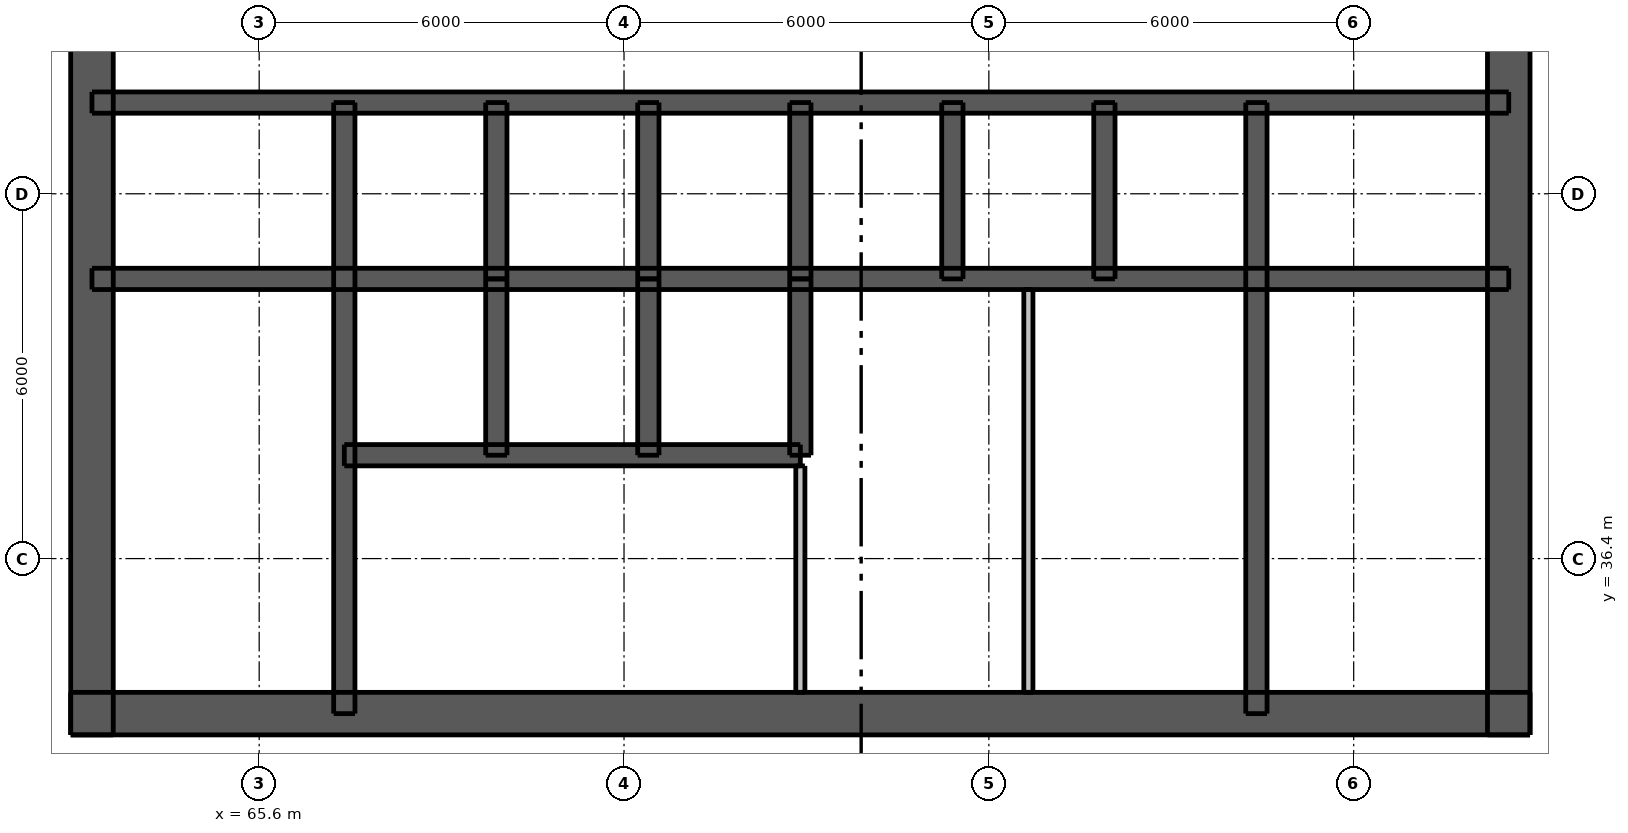
"""IFC4 building model, lengths in metres.
Left out: names, types, materials, properties, quantities, classifications, styles, units other than length and angle.
Written with IfcOpenShell. Run it as: python <this file> out.ifc"""

import sys

from ifc_helpers import new_model, si_unit, direction, frame, frame_2d, origin, place, context, subcontext, project, spatial, rectangle, extrude, element, fill, save


model = new_model("IFC4")
c1 = context("Model", 3, precision=1e-05, world=origin(), true_north=direction((0.0, 1.0)))
c2 = subcontext(c1, "Body", "Model", "MODEL_VIEW")
j1 = project(units=[si_unit("LENGTHUNIT", "METRE"), si_unit("PLANEANGLEUNIT", "RADIAN")], contexts=[c1])
p1 = place(None, origin())
s1 = spatial("IfcSite", under=j1, at=p1, CompositionType="ELEMENT")
p2 = place(p1, origin())
s2 = spatial("IfcBuilding", under=s1, at=p2, CompositionType="ELEMENT")
p3 = place(p2, frame((0.0, 0.0, 154.9)))
s3 = spatial("IfcBuildingStorey", under=s2, at=p3, CompositionType="ELEMENT", Elevation=154.9)
p4 = place(p3, frame((62.5, 33.85, 0.0), z_axis=(0.0, 0.0, 1.0), x_axis=(1.0, 0.0, 0.0)))
e1 = element("IfcWall", 1, at=p4, inside=s3, PredefinedType="SHEAR", context=c2, shape_type="SweptSolid", body=[
    extrude(rectangle(XDim=24.0, YDim=0.7, at=frame_2d((12.0, 0.0))), origin(), (0.0, 0.0, 1.0), 3.05),
])
p5 = place(p4, frame((1.962, 0.0, 0.0)))
e2 = element("IfcOpeningElement", 2, at=p5, cuts=e1, PredefinedType="OPENING", context=c2, shape_type="SweptSolid", body=[
    extrude(rectangle(XDim=1.1, YDim=2.1, at=frame_2d((0.55, 1.05))), frame((0.0, 0.36, 0.0), z_axis=(0.0, -1.0, 0.0), x_axis=(1.0, 0.0, 0.0)), (0.0, 0.0, 1.0), 0.72),
])
p6 = place(p4, frame((20.938, 0.0, 0.0)))
e3 = element("IfcOpeningElement", 3, at=p6, cuts=e1, PredefinedType="OPENING", context=c2, shape_type="SweptSolid", body=[
    extrude(rectangle(XDim=1.1, YDim=2.1, at=frame_2d((0.55, 1.05))), frame((0.0, 0.36, 0.0), z_axis=(0.0, -1.0, 0.0), x_axis=(1.0, 0.0, 0.0)), (0.0, 0.0, 1.0), 0.72),
])
p7 = place(p4, frame((8.0, 0.0, 0.0)))
e4 = element("IfcOpeningElement", 4, at=p7, cuts=e1, PredefinedType="OPENING", context=c2, shape_type="SweptSolid", body=[
    extrude(rectangle(XDim=1.1, YDim=2.1, at=frame_2d((0.55, 1.05))), frame((0.0, 0.36, 0.0), z_axis=(0.0, -1.0, 0.0), x_axis=(1.0, 0.0, 0.0)), (0.0, 0.0, 1.0), 0.72),
])
p8 = place(p4, frame((13.512, 0.0, 0.0)))
e5 = element("IfcOpeningElement", 5, at=p8, cuts=e1, PredefinedType="OPENING", context=c2, shape_type="SweptSolid", body=[
    extrude(rectangle(XDim=0.9, YDim=2.1, at=frame_2d((0.45, 1.05))), frame((0.0, 0.36, 0.0), z_axis=(0.0, -1.0, 0.0), x_axis=(1.0, 0.0, 0.0)), (0.0, 0.0, 1.0), 0.72),
])
p9 = place(p4, frame((17.087, 0.0, 0.0)))
e6 = element("IfcOpeningElement", 6, at=p9, cuts=e1, PredefinedType="OPENING", context=c2, shape_type="SweptSolid", body=[
    extrude(rectangle(XDim=0.9, YDim=2.1, at=frame_2d((0.45, 1.05))), frame((0.0, 0.36, 0.0), z_axis=(0.0, -1.0, 0.0), x_axis=(1.0, 0.0, 0.0)), (0.0, 0.0, 1.0), 0.72),
])
p10 = place(p3, frame((62.85, 33.5, 0.0), z_axis=(0.0, 0.0, 1.0), x_axis=(0.0, 1.0, 0.0)))
e7 = element("IfcWall", 7, at=p10, inside=s3, PredefinedType="SHEAR", context=c2, shape_type="SweptSolid", body=[
    extrude(rectangle(XDim=24.0, YDim=0.7, at=frame_2d((12.0, 0.0))), origin(), (0.0, 0.0, 1.0), 3.05),
])
p11 = place(p10, frame((11.2, 0.0, 0.0)))
e8 = element("IfcOpeningElement", 8, at=p11, cuts=e7, PredefinedType="OPENING", context=c2, shape_type="SweptSolid", body=[
    extrude(rectangle(XDim=1.6, YDim=2.1, at=frame_2d((0.8, 1.05))), frame((0.0, 0.36, 0.0), z_axis=(0.0, -1.0, 0.0), x_axis=(1.0, 0.0, 0.0)), (0.0, 0.0, 1.0), 0.72),
])
p12 = place(p3, frame((86.15, 33.5, 0.0), z_axis=(0.0, 0.0, 1.0), x_axis=(0.0, 1.0, 0.0)))
e9 = element("IfcWall", 9, at=p12, inside=s3, PredefinedType="SHEAR", context=c2, shape_type="SweptSolid", body=[
    extrude(rectangle(XDim=24.0, YDim=0.7, at=frame_2d((12.0, 0.0))), origin(), (0.0, 0.0, 1.0), 3.05),
])
p13 = place(p12, frame((11.2, 0.0, 0.0)))
e10 = element("IfcOpeningElement", 10, at=p13, cuts=e9, PredefinedType="OPENING", context=c2, shape_type="SweptSolid", body=[
    extrude(rectangle(XDim=1.6, YDim=2.1, at=frame_2d((0.8, 1.05))), frame((0.0, 0.36, 0.0), z_axis=(0.0, -1.0, 0.0), x_axis=(1.0, 0.0, 0.0)), (0.0, 0.0, 1.0), 0.72),
])
p14 = place(p3, frame((62.85, 41.0, 0.0), z_axis=(0.0, 0.0, 1.0), x_axis=(1.0, 0.0, 0.0)))
e11 = element("IfcWall", 11, at=p14, inside=s3, PredefinedType="SHEAR", context=c2, shape_type="SweptSolid", body=[
    extrude(rectangle(XDim=23.3, YDim=0.35, at=frame_2d((11.65, 0.0))), origin(), (0.0, 0.0, 1.0), 3.05),
])
p15 = place(p3, frame((62.85, 43.9, 0.0), z_axis=(0.0, 0.0, 1.0), x_axis=(1.0, 0.0, 0.0)))
e12 = element("IfcWall", 12, at=p15, inside=s3, PredefinedType="SHEAR", context=c2, shape_type="SweptSolid", body=[
    extrude(rectangle(XDim=23.3, YDim=0.35, at=frame_2d((11.65, 0.0))), origin(), (0.0, 0.0, 1.0), 3.05),
])
p16 = place(p15, frame((1.712, 0.0, 0.0)))
e13 = element("IfcOpeningElement", 13, at=p16, cuts=e12, PredefinedType="OPENING", context=c2, shape_type="SweptSolid", body=[
    extrude(rectangle(XDim=0.9, YDim=2.1, at=frame_2d((0.45, 1.05))), frame((0.0, 0.185, 0.0), z_axis=(0.0, -1.0, 0.0), x_axis=(1.0, 0.0, 0.0)), (0.0, 0.0, 1.0), 0.37),
])
p17 = place(p15, frame((20.688, 0.0, 0.0)))
e14 = element("IfcOpeningElement", 14, at=p17, cuts=e12, PredefinedType="OPENING", context=c2, shape_type="SweptSolid", body=[
    extrude(rectangle(XDim=0.9, YDim=2.1, at=frame_2d((0.45, 1.05))), frame((0.0, 0.185, 0.0), z_axis=(0.0, -1.0, 0.0), x_axis=(1.0, 0.0, 0.0)), (0.0, 0.0, 1.0), 0.37),
])
p18 = place(p3, frame((67.0, 33.85, 0.0), z_axis=(0.0, 0.0, 1.0), x_axis=(0.0, 1.0, 0.0)))
e15 = element("IfcWall", 15, at=p18, inside=s3, PredefinedType="SHEAR", context=c2, shape_type="SweptSolid", body=[
    extrude(rectangle(XDim=10.05, YDim=0.35, at=frame_2d((5.025, 0.0))), origin(), (0.0, 0.0, 1.0), 3.05),
])
p19 = place(p18, frame((0.55, 0.0, 0.0)))
e16 = element("IfcOpeningElement", 16, at=p19, cuts=e15, PredefinedType="OPENING", context=c2, shape_type="SweptSolid", body=[
    extrude(rectangle(XDim=1.1, YDim=2.1, at=frame_2d((0.55, 1.05))), frame((0.0, 0.185, 0.0), z_axis=(0.0, -1.0, 0.0), x_axis=(1.0, 0.0, 0.0)), (0.0, 0.0, 1.0), 0.37),
])
p20 = place(p3, frame((82.0, 33.85, 0.0), z_axis=(0.0, 0.0, 1.0), x_axis=(0.0, 1.0, 0.0)))
e17 = element("IfcWall", 17, at=p20, inside=s3, PredefinedType="SHEAR", context=c2, shape_type="SweptSolid", body=[
    extrude(rectangle(XDim=10.05, YDim=0.35, at=frame_2d((5.025, 0.0))), origin(), (0.0, 0.0, 1.0), 3.05),
])
for number, where, z_axis, x_axis in (
    (18, (69.5, 41.0, 0.0), (0.0, 0.0, 1.0), (0.0, 1.0, 0.0)),
    (19, (72.0, 41.0, 0.0), (0.0, 0.0, 1.0), (0.0, 1.0, 0.0)),
    (20, (74.5, 41.0, 0.0), (0.0, 0.0, 1.0), (0.0, 1.0, 0.0)),
    (21, (77.0, 41.0, 0.0), (0.0, 0.0, 1.0), (0.0, 1.0, 0.0)),
    (22, (79.5, 41.0, 0.0), (0.0, 0.0, 1.0), (0.0, 1.0, 0.0)),
):
    element("IfcWall", number, at=place(p3, frame(where, z_axis=z_axis, x_axis=x_axis)), inside=s3, PredefinedType="SHEAR", context=c2, shape_type="SweptSolid", body=[
        extrude(rectangle(XDim=2.9, YDim=0.35, at=frame_2d((1.45, 0.0))), origin(), (0.0, 0.0, 1.0), 3.05),
    ])
p21 = place(p3, frame((67.0, 38.1, 0.0), z_axis=(0.0, 0.0, 1.0), x_axis=(1.0, 0.0, 0.0)))
e23 = element("IfcWall", 23, at=p21, inside=s3, PredefinedType="SHEAR", context=c2, shape_type="SweptSolid", body=[
    extrude(rectangle(XDim=7.5, YDim=0.35, at=frame_2d((3.75, 0.0))), origin(), (0.0, 0.0, 1.0), 3.05),
])
p22 = place(p21, frame((0.7, 0.0, 0.0)))
e24 = element("IfcOpeningElement", 24, at=p22, cuts=e23, PredefinedType="OPENING", context=c2, shape_type="SweptSolid", body=[
    extrude(rectangle(XDim=1.1, YDim=2.1, at=frame_2d((0.55, 1.05))), frame((0.0, 0.185, 0.0), z_axis=(0.0, -1.0, 0.0), x_axis=(1.0, 0.0, 0.0)), (0.0, 0.0, 1.0), 0.37),
])
p23 = place(p21, frame((3.2, 0.0, 0.0)))
e25 = element("IfcOpeningElement", 25, at=p23, cuts=e23, PredefinedType="OPENING", context=c2, shape_type="SweptSolid", body=[
    extrude(rectangle(XDim=1.1, YDim=2.1, at=frame_2d((0.55, 1.05))), frame((0.0, 0.185, 0.0), z_axis=(0.0, -1.0, 0.0), x_axis=(1.0, 0.0, 0.0)), (0.0, 0.0, 1.0), 0.37),
])
p24 = place(p21, frame((5.65, 0.0, 0.0)))
e26 = element("IfcOpeningElement", 26, at=p24, cuts=e23, PredefinedType="OPENING", context=c2, shape_type="SweptSolid", body=[
    extrude(rectangle(XDim=1.2, YDim=2.1, at=frame_2d((0.6, 1.05))), frame((0.0, 0.185, 0.0), z_axis=(0.0, -1.0, 0.0), x_axis=(1.0, 0.0, 0.0)), (0.0, 0.0, 1.0), 0.37),
])
for number, where, z_axis, x_axis in (
    (27, (69.5, 38.1, 0.0), (0.0, 0.0, 1.0), (0.0, 1.0, 0.0)),
    (28, (72.0, 38.1, 0.0), (0.0, 0.0, 1.0), (0.0, 1.0, 0.0)),
    (29, (74.5, 38.1, 0.0), (0.0, 0.0, 1.0), (0.0, 1.0, 0.0)),
):
    element("IfcWall", number, at=place(p3, frame(where, z_axis=z_axis, x_axis=x_axis)), inside=s3, PredefinedType="SHEAR", context=c2, shape_type="SweptSolid", body=[
        extrude(rectangle(XDim=2.9, YDim=0.35, at=frame_2d((1.45, 0.0))), origin(), (0.0, 0.0, 1.0), 3.05),
    ])
p25 = place(p3, frame((74.5, 34.2, 0.0), z_axis=(0.0, 0.0, 1.0), x_axis=(0.0, 1.0, 0.0)))
e30 = element("IfcWall", 30, at=p25, inside=s3, PredefinedType="PLUMBINGWALL", context=c2, shape_type="SweptSolid", body=[
    extrude(rectangle(XDim=3.725, YDim=0.15, at=frame_2d((1.863, 0.0))), origin(), (0.0, 0.0, 1.0), 3.05),
])
p26 = place(p3, frame((78.25, 34.2, 0.0), z_axis=(0.0, 0.0, 1.0), x_axis=(0.0, 1.0, 0.0)))
e31 = element("IfcWall", 31, at=p26, inside=s3, PredefinedType="PLUMBINGWALL", context=c2, shape_type="SweptSolid", body=[
    extrude(rectangle(XDim=6.625, YDim=0.15, at=frame_2d((3.312, 0.0))), origin(), (0.0, 0.0, 1.0), 3.05),
])
p27 = place(p5, origin())
e32 = element("IfcDoor", 32, at=p27, inside=s3, OperationType="SINGLE_SWING_LEFT", PredefinedType="DOOR", context=c2, shape_type="SweptSolid", body=[
    extrude(rectangle(XDim=1.1, YDim=2.1, at=frame_2d((0.55, 1.05))), frame((0.0, 0.337, 0.0), z_axis=(0.0, -1.0, 0.0), x_axis=(1.0, 0.0, 0.0)), (0.0, 0.0, 1.0), 0.05),
])
fill(e2, e32)
p28 = place(p6, origin())
e33 = element("IfcDoor", 33, at=p28, inside=s3, OperationType="SINGLE_SWING_RIGHT", PredefinedType="DOOR", context=c2, shape_type="SweptSolid", body=[
    extrude(rectangle(XDim=1.1, YDim=2.1, at=frame_2d((0.55, 1.05))), frame((0.0, 0.337, 0.0), z_axis=(0.0, -1.0, 0.0), x_axis=(1.0, 0.0, 0.0)), (0.0, 0.0, 1.0), 0.05),
])
fill(e3, e33)
p29 = place(p11, origin())
e34 = element("IfcDoor", 34, at=p29, inside=s3, OperationType="DOUBLE_DOOR_SINGLE_SWING", PredefinedType="DOOR", context=c2, shape_type="SweptSolid", body=[
    extrude(rectangle(XDim=1.6, YDim=2.1, at=frame_2d((0.8, 1.05))), frame((0.0, -0.288, 0.0), z_axis=(0.0, -1.0, 0.0), x_axis=(1.0, 0.0, 0.0)), (0.0, 0.0, 1.0), 0.05),
])
fill(e8, e34)
p30 = place(p13, origin())
e35 = element("IfcDoor", 35, at=p30, inside=s3, OperationType="DOUBLE_DOOR_SINGLE_SWING", PredefinedType="DOOR", context=c2, shape_type="SweptSolid", body=[
    extrude(rectangle(XDim=1.6, YDim=2.1, at=frame_2d((0.8, 1.05))), frame((0.0, 0.337, 0.0), z_axis=(0.0, -1.0, 0.0), x_axis=(1.0, 0.0, 0.0)), (0.0, 0.0, 1.0), 0.05),
])
fill(e10, e35)
p31 = place(p7, origin())
e36 = element("IfcDoor", 36, at=p31, inside=s3, OperationType="SINGLE_SWING_LEFT", PredefinedType="DOOR", context=c2, shape_type="SweptSolid", body=[
    extrude(rectangle(XDim=1.1, YDim=2.1, at=frame_2d((0.55, 1.05))), frame((0.0, 0.337, 0.0), z_axis=(0.0, -1.0, 0.0), x_axis=(1.0, 0.0, 0.0)), (0.0, 0.0, 1.0), 0.05),
])
fill(e4, e36)
p32 = place(p19, origin())
e37 = element("IfcDoor", 37, at=p32, inside=s3, OperationType="SINGLE_SWING_RIGHT", PredefinedType="DOOR", context=c2, shape_type="SweptSolid", body=[
    extrude(rectangle(XDim=1.1, YDim=2.1, at=frame_2d((0.55, 1.05))), frame((0.0, -0.112, 0.0), z_axis=(0.0, -1.0, 0.0), x_axis=(1.0, 0.0, 0.0)), (0.0, 0.0, 1.0), 0.05),
])
fill(e16, e37)
p33 = place(p8, origin())
e38 = element("IfcDoor", 38, at=p33, inside=s3, OperationType="SINGLE_SWING_LEFT", PredefinedType="DOOR", context=c2, shape_type="SweptSolid", body=[
    extrude(rectangle(XDim=0.9, YDim=2.1, at=frame_2d((0.45, 1.05))), frame((0.0, 0.337, 0.0), z_axis=(0.0, -1.0, 0.0), x_axis=(1.0, 0.0, 0.0)), (0.0, 0.0, 1.0), 0.05),
])
fill(e5, e38)
p34 = place(p9, origin())
e39 = element("IfcDoor", 39, at=p34, inside=s3, OperationType="SINGLE_SWING_LEFT", PredefinedType="DOOR", context=c2, shape_type="SweptSolid", body=[
    extrude(rectangle(XDim=0.9, YDim=2.1, at=frame_2d((0.45, 1.05))), frame((0.0, 0.337, 0.0), z_axis=(0.0, -1.0, 0.0), x_axis=(1.0, 0.0, 0.0)), (0.0, 0.0, 1.0), 0.05),
])
fill(e6, e39)
p35 = place(p16, origin())
e40 = element("IfcDoor", 40, at=p35, inside=s3, OperationType="SINGLE_SWING_LEFT", PredefinedType="DOOR", context=c2, shape_type="SweptSolid", body=[
    extrude(rectangle(XDim=0.9, YDim=2.1, at=frame_2d((0.45, 1.05))), frame((0.0, -0.112, 0.0), z_axis=(0.0, -1.0, 0.0), x_axis=(1.0, 0.0, 0.0)), (0.0, 0.0, 1.0), 0.05),
])
fill(e13, e40)
p36 = place(p17, origin())
e41 = element("IfcDoor", 41, at=p36, inside=s3, OperationType="SINGLE_SWING_LEFT", PredefinedType="DOOR", context=c2, shape_type="SweptSolid", body=[
    extrude(rectangle(XDim=0.9, YDim=2.1, at=frame_2d((0.45, 1.05))), frame((0.0, -0.112, 0.0), z_axis=(0.0, -1.0, 0.0), x_axis=(1.0, 0.0, 0.0)), (0.0, 0.0, 1.0), 0.05),
])
fill(e14, e41)
p37 = place(p22, origin())
e42 = element("IfcDoor", 42, at=p37, inside=s3, OperationType="DOUBLE_DOOR_SLIDING", PredefinedType="DOOR", context=c2, shape_type="SweptSolid", body=[
    extrude(rectangle(XDim=1.1, YDim=2.1, at=frame_2d((0.55, 1.05))), frame((0.0, 0.025, 0.0), z_axis=(0.0, -1.0, 0.0), x_axis=(1.0, 0.0, 0.0)), (0.0, 0.0, 1.0), 0.05),
])
fill(e24, e42)
p38 = place(p23, origin())
e43 = element("IfcDoor", 43, at=p38, inside=s3, OperationType="DOUBLE_DOOR_SLIDING", PredefinedType="DOOR", context=c2, shape_type="SweptSolid", body=[
    extrude(rectangle(XDim=1.1, YDim=2.1, at=frame_2d((0.55, 1.05))), frame((0.0, 0.025, 0.0), z_axis=(0.0, -1.0, 0.0), x_axis=(1.0, 0.0, 0.0)), (0.0, 0.0, 1.0), 0.05),
])
fill(e25, e43)
p39 = place(p24, origin())
e44 = element("IfcDoor", 44, at=p39, inside=s3, OperationType="DOUBLE_DOOR_SLIDING", PredefinedType="DOOR", context=c2, shape_type="SweptSolid", body=[
    extrude(rectangle(XDim=1.2, YDim=2.1, at=frame_2d((0.6, 1.05))), frame((0.0, 0.025, 0.0), z_axis=(0.0, -1.0, 0.0), x_axis=(1.0, 0.0, 0.0)), (0.0, 0.0, 1.0), 0.05),
])
fill(e26, e44)
save(model, sys.argv[1])
